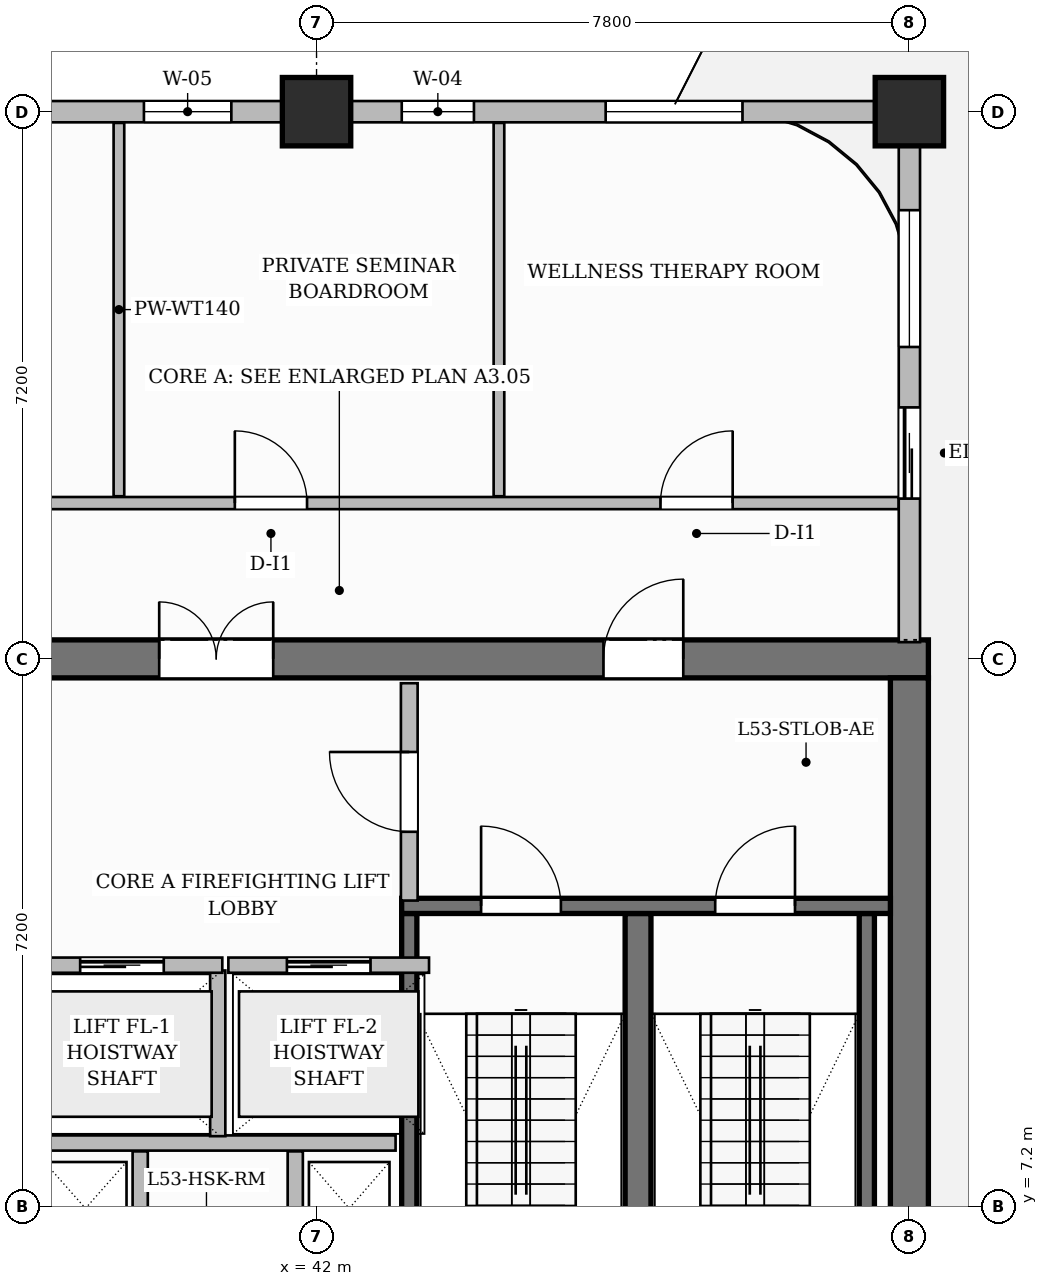
"""IFC4 building model, lengths in metres.
Left out: names, types, materials, properties, quantities, classifications, styles, units other than length and angle.
Written with IfcOpenShell. Run it as: python <this file> out.ifc"""

import sys

from ifc_helpers import new_model, si_unit, direction, frame, frame_2d, origin, origin_2d, place, context, subcontext, project, spatial, rectangle, extrude, source, transform, mapped, element, fill, save


model = new_model("IFC4")
c1 = context("Model", 3, precision=1e-05, world=origin(), true_north=direction((0.0, 1.0)))
c2 = subcontext(c1, "Body", "Model", "MODEL_VIEW")
j1 = project(units=[si_unit("LENGTHUNIT", "METRE"), si_unit("PLANEANGLEUNIT", "RADIAN")], contexts=[c1])
p1 = place(None, origin())
s1 = spatial("IfcSite", under=j1, at=p1, CompositionType="ELEMENT")
p2 = place(p1, origin())
s2 = spatial("IfcBuilding", under=s1, at=p2, CompositionType="ELEMENT")
p3 = place(p2, frame((0.0, 0.0, 213.45)))
s3 = spatial("IfcBuildingStorey", under=s2, at=p3, CompositionType="ELEMENT", Elevation=213.45)
p4 = place(p3, frame((34.55, 14.4, 0.0), z_axis=(0.0, 0.0, 1.0), x_axis=(1.0, 0.0, 0.0)))
e1 = element("IfcWall", 1, at=p4, inside=s3, PredefinedType="SHEAR", context=c2, shape_type="SweptSolid", body=[
    extrude(rectangle(XDim=15.5, YDim=0.5, at=frame_2d((7.75, 0.0))), origin(), (0.0, 0.0, 1.0), 3.85),
])
p5 = place(p4, frame((5.38, 0.0, 0.0)))
e2 = element("IfcOpeningElement", 2, at=p5, cuts=e1, PredefinedType="OPENING", context=c2, shape_type="SweptSolid", body=[
    extrude(rectangle(XDim=1.5, YDim=2.2, at=frame_2d((0.75, 1.1))), frame((0.0, 0.26, 0.0), z_axis=(0.0, -1.0, 0.0), x_axis=(1.0, 0.0, 0.0)), (0.0, 0.0, 1.0), 0.52),
])
p6 = place(p4, frame((1.595, 0.0, 0.0)))
e3 = element("IfcOpeningElement", 3, at=p6, cuts=e1, PredefinedType="OPENING", context=c2, shape_type="SweptSolid", body=[
    extrude(rectangle(XDim=1.05, YDim=2.15, at=frame_2d((0.525, 1.075))), frame((0.0, 0.26, 0.0), z_axis=(0.0, -1.0, 0.0), x_axis=(1.0, 0.0, 0.0)), (0.0, 0.0, 1.0), 0.52),
])
p7 = place(p4, frame((11.225, 0.0, 0.0)))
e4 = element("IfcOpeningElement", 4, at=p7, cuts=e1, PredefinedType="OPENING", context=c2, shape_type="SweptSolid", body=[
    extrude(rectangle(XDim=1.05, YDim=2.15, at=frame_2d((0.525, 1.075))), frame((0.0, 0.26, 0.0), z_axis=(0.0, -1.0, 0.0), x_axis=(1.0, 0.0, 0.0)), (0.0, 0.0, 1.0), 0.52),
])
p8 = place(p3, frame((49.8, 3.85, 0.0), z_axis=(0.0, 0.0, 1.0), x_axis=(0.0, 1.0, 0.0)))
e5 = element("IfcWall", 5, at=p8, inside=s3, PredefinedType="SHEAR", context=c2, shape_type="SweptSolid", body=[
    extrude(rectangle(XDim=10.3, YDim=0.5, at=frame_2d((5.15, 0.0))), origin(), (0.0, 0.0, 1.0), 3.85),
])
m1 = source(origin(), c2, "Body", "SweptSolid", [
    extrude(rectangle(XDim=0.9, YDim=0.9, at=origin_2d()), origin(), (0.0, 0.0, 1.0), 3.85),
])
for number, where, z_axis, x_axis in (
    (6, (42.0, 21.6, 0.0), (0.0, 0.0, 1.0), (1.0, 0.0, 0.0)),
    (7, (49.8, 21.6, 0.0), (0.0, 0.0, 1.0), (1.0, 0.0, 0.0)),
):
    element("IfcColumn", number, at=place(p3, frame(where, z_axis=z_axis, x_axis=x_axis)), inside=s3, PredefinedType="COLUMN", context=c2, shape_type="MappedRepresentation", body=[
        mapped(m1, transform((0.0, 0.0, 0.0), scale=1.0)),
    ])
p9 = place(p3, frame((43.22, 4.1, 0.0), z_axis=(0.0, 0.0, 1.0), x_axis=(0.0, 1.0, 0.0)))
e8 = element("IfcWall", 8, at=p9, inside=s3, PredefinedType="SHEAR", context=c2, shape_type="SweptSolid", body=[
    extrude(rectangle(XDim=6.95, YDim=0.2, at=frame_2d((3.475, 0.0))), origin(), (0.0, 0.0, 1.0), 3.85),
])
p10 = place(p3, frame((46.23, 4.1, 0.0), z_axis=(0.0, 0.0, 1.0), x_axis=(0.0, 1.0, 0.0)))
e9 = element("IfcWall", 9, at=p10, inside=s3, PredefinedType="SHEAR", context=c2, shape_type="SweptSolid", body=[
    extrude(rectangle(XDim=6.95, YDim=0.34, at=frame_2d((3.475, 0.0))), origin(), (0.0, 0.0, 1.0), 3.85),
])
p11 = place(p3, frame((49.24, 4.1, 0.0), z_axis=(0.0, 0.0, 1.0), x_axis=(0.0, 1.0, 0.0)))
e10 = element("IfcWall", 10, at=p11, inside=s3, PredefinedType="SHEAR", context=c2, shape_type="SweptSolid", body=[
    extrude(rectangle(XDim=6.95, YDim=0.2, at=frame_2d((3.475, 0.0))), origin(), (0.0, 0.0, 1.0), 3.85),
])
p12 = place(p3, frame((43.12, 11.15, 0.0), z_axis=(0.0, 0.0, 1.0), x_axis=(1.0, 0.0, 0.0)))
e11 = element("IfcWall", 11, at=p12, inside=s3, PredefinedType="SHEAR", context=c2, shape_type="SweptSolid", body=[
    extrude(rectangle(XDim=6.43, YDim=0.2, at=frame_2d((3.215, 0.0))), origin(), (0.0, 0.0, 1.0), 3.85),
])
p13 = place(p12, frame((1.045, 0.0, 0.0)))
e12 = element("IfcOpeningElement", 12, at=p13, cuts=e11, PredefinedType="OPENING", context=c2, shape_type="SweptSolid", body=[
    extrude(rectangle(XDim=1.05, YDim=2.2, at=frame_2d((0.525, 1.1))), frame((0.0, 0.11, 0.0), z_axis=(0.0, -1.0, 0.0), x_axis=(1.0, 0.0, 0.0)), (0.0, 0.0, 1.0), 0.22),
])
p14 = place(p12, frame((4.125, 0.0, 0.0)))
e13 = element("IfcOpeningElement", 13, at=p14, cuts=e11, PredefinedType="OPENING", context=c2, shape_type="SweptSolid", body=[
    extrude(rectangle(XDim=1.05, YDim=2.2, at=frame_2d((0.525, 1.1))), frame((0.0, 0.11, 0.0), z_axis=(0.0, -1.0, 0.0), x_axis=(1.0, 0.0, 0.0)), (0.0, 0.0, 1.0), 0.22),
])
p15 = place(p3, frame((38.3, 8.03, 0.0), z_axis=(0.0, 0.0, 1.0), x_axis=(1.0, 0.0, 0.0)))
e14 = element("IfcWall", 14, at=p15, inside=s3, PredefinedType="PARTITIONING", context=c2, shape_type="SweptSolid", body=[
    extrude(rectangle(XDim=4.74, YDim=0.2, at=frame_2d((2.37, 0.0))), origin(), (0.0, 0.0, 1.0), 3.6),
])
p16 = place(p3, frame((40.7, 8.12, 0.0), z_axis=(0.0, 0.0, 1.0), x_axis=(0.0, 1.0, 0.0)))
e15 = element("IfcWall", 15, at=p16, inside=s3, PredefinedType="PARTITIONING", context=c2, shape_type="SweptSolid", body=[
    extrude(rectangle(XDim=2.18, YDim=0.2, at=frame_2d((1.09, 0.0))), origin(), (0.0, 0.0, 1.0), 3.6),
])
p17 = place(p3, frame((43.22, 11.22, 0.0), z_axis=(0.0, 0.0, 1.0), x_axis=(0.0, 1.0, 0.0)))
e16 = element("IfcWall", 16, at=p17, inside=s3, PredefinedType="PARTITIONING", context=c2, shape_type="SweptSolid", body=[
    extrude(rectangle(XDim=2.86, YDim=0.22, at=frame_2d((1.43, 0.0))), origin(), (0.0, 0.0, 1.0), 3.6),
])
p18 = place(p17, frame((0.905, 0.0, 0.0)))
e17 = element("IfcOpeningElement", 17, at=p18, cuts=e16, PredefinedType="OPENING", context=c2, shape_type="SweptSolid", body=[
    extrude(rectangle(XDim=1.05, YDim=2.15, at=frame_2d((0.525, 1.075))), frame((0.0, 0.12, 0.0), z_axis=(0.0, -1.0, 0.0), x_axis=(1.0, 0.0, 0.0)), (0.0, 0.0, 1.0), 0.24),
])
for number, where, z_axis, x_axis in (
    (18, (39.68, 6.13, 0.0), (0.0, 0.0, 1.0), (0.0, 1.0, 0.0)),
    (19, (41.72, 6.13, 0.0), (0.0, 0.0, 1.0), (0.0, 1.0, 0.0)),
):
    element("IfcWall", number, at=place(p3, frame(where, z_axis=z_axis, x_axis=x_axis)), inside=s3, PredefinedType="PARTITIONING", context=c2, shape_type="SweptSolid", body=[
        extrude(rectangle(XDim=1.79, YDim=0.2, at=frame_2d((0.895, 0.0))), origin(), (0.0, 0.0, 1.0), 3.6),
    ])
p19 = place(p3, frame((30.29, 16.45, 0.0), z_axis=(0.0, 0.0, 1.0), x_axis=(1.0, 0.0, 0.0)))
e20 = element("IfcWall", 20, at=p19, inside=s3, PredefinedType="PARTITIONING", context=c2, shape_type="SweptSolid", body=[
    extrude(rectangle(XDim=19.37, YDim=0.16, at=frame_2d((9.685, 0.0))), origin(), (0.0, 0.0, 1.0), 3.6),
])
p20 = place(p19, frame((1.135, 0.0, 0.0)))
e21 = element("IfcOpeningElement", 21, at=p20, cuts=e20, PredefinedType="OPENING", context=c2, shape_type="SweptSolid", body=[
    extrude(rectangle(XDim=0.85, YDim=2.1, at=frame_2d((0.425, 1.05))), frame((0.0, 0.09, 0.0), z_axis=(0.0, -1.0, 0.0), x_axis=(1.0, 0.0, 0.0)), (0.0, 0.0, 1.0), 0.18),
])
p21 = place(p19, frame((5.71, 0.0, 0.0)))
e22 = element("IfcOpeningElement", 22, at=p21, cuts=e20, PredefinedType="OPENING", context=c2, shape_type="SweptSolid", body=[
    extrude(rectangle(XDim=0.9, YDim=2.15, at=frame_2d((0.45, 1.075))), frame((0.0, 0.09, 0.0), z_axis=(0.0, -1.0, 0.0), x_axis=(1.0, 0.0, 0.0)), (0.0, 0.0, 1.0), 0.18),
])
p22 = place(p19, frame((10.635, 0.0, 0.0)))
e23 = element("IfcOpeningElement", 23, at=p22, cuts=e20, PredefinedType="OPENING", context=c2, shape_type="SweptSolid", body=[
    extrude(rectangle(XDim=0.95, YDim=2.15, at=frame_2d((0.475, 1.075))), frame((0.0, 0.09, 0.0), z_axis=(0.0, -1.0, 0.0), x_axis=(1.0, 0.0, 0.0)), (0.0, 0.0, 1.0), 0.18),
])
p23 = place(p19, frame((16.235, 0.0, 0.0)))
e24 = element("IfcOpeningElement", 24, at=p23, cuts=e20, PredefinedType="OPENING", context=c2, shape_type="SweptSolid", body=[
    extrude(rectangle(XDim=0.95, YDim=2.15, at=frame_2d((0.475, 1.075))), frame((0.0, 0.09, 0.0), z_axis=(0.0, -1.0, 0.0), x_axis=(1.0, 0.0, 0.0)), (0.0, 0.0, 1.0), 0.18),
])
for number, where, z_axis, x_axis in (
    (25, (39.4, 16.54, 0.0), (0.0, 0.0, 1.0), (0.0, 1.0, 0.0)),
    (26, (44.4, 16.54, 0.0), (0.0, 0.0, 1.0), (0.0, 1.0, 0.0)),
):
    element("IfcWall", number, at=place(p3, frame(where, z_axis=z_axis, x_axis=x_axis)), inside=s3, PredefinedType="PARTITIONING", context=c2, shape_type="SweptSolid", body=[
        extrude(rectangle(XDim=4.912, YDim=0.14, at=frame_2d((2.456, 0.0))), origin(), (0.0, 0.0, 1.0), 3.6),
    ])
p24 = place(p3, frame((38.12, 10.37, 0.0), z_axis=(0.0, 0.0, 1.0), x_axis=(1.0, 0.0, 0.0)))
e27 = element("IfcWall", 27, at=p24, inside=s3, PredefinedType="PARTITIONING", context=c2, shape_type="SweptSolid", body=[
    extrude(rectangle(XDim=2.64, YDim=0.2, at=frame_2d((1.32, 0.0))), origin(), (0.0, 0.0, 1.0), 3.6),
])
p25 = place(p24, frame((0.77, 0.0, 0.0)))
e28 = element("IfcOpeningElement", 28, at=p25, cuts=e27, PredefinedType="OPENING", context=c2, shape_type="SweptSolid", body=[
    extrude(rectangle(XDim=1.1, YDim=2.2, at=frame_2d((0.55, 1.1))), frame((0.0, 0.11, 0.0), z_axis=(0.0, -1.0, 0.0), x_axis=(1.0, 0.0, 0.0)), (0.0, 0.0, 1.0), 0.22),
])
p26 = place(p3, frame((40.84, 10.37, 0.0), z_axis=(0.0, 0.0, 1.0), x_axis=(1.0, 0.0, 0.0)))
e29 = element("IfcWall", 29, at=p26, inside=s3, PredefinedType="PARTITIONING", context=c2, shape_type="SweptSolid", body=[
    extrude(rectangle(XDim=2.64, YDim=0.2, at=frame_2d((1.32, 0.0))), origin(), (0.0, 0.0, 1.0), 3.6),
])
p27 = place(p26, frame((0.77, 0.0, 0.0)))
e30 = element("IfcOpeningElement", 30, at=p27, cuts=e29, PredefinedType="OPENING", context=c2, shape_type="SweptSolid", body=[
    extrude(rectangle(XDim=1.1, YDim=2.2, at=frame_2d((0.55, 1.1))), frame((0.0, 0.11, 0.0), z_axis=(0.0, -1.0, 0.0), x_axis=(1.0, 0.0, 0.0)), (0.0, 0.0, 1.0), 0.22),
])
p28 = place(p3, frame((49.8, 14.62, 0.0), z_axis=(0.0, 0.0, 1.0), x_axis=(0.0, 1.0, 0.0)))
e31 = element("IfcWall", 31, at=p28, inside=s3, PredefinedType="SOLIDWALL", context=c2, shape_type="SweptSolid", body=[
    extrude(rectangle(XDim=6.93, YDim=0.28, at=frame_2d((3.465, 0.0))), origin(), (0.0, 0.0, 1.0), 3.135),
])
p29 = place(p28, frame((1.889, 0.0, 0.0)))
e32 = element("IfcOpeningElement", 32, at=p29, cuts=e31, PredefinedType="OPENING", context=c2, shape_type="SweptSolid", body=[
    extrude(rectangle(XDim=1.2, YDim=2.2, at=frame_2d((0.6, 1.1))), frame((0.0, 0.15, 0.0), z_axis=(0.0, -1.0, 0.0), x_axis=(1.0, 0.0, 0.0)), (0.0, 0.0, 1.0), 0.3),
])
p30 = place(p28, frame((3.884, 0.0, 0.8)))
e33 = element("IfcOpeningElement", 33, at=p30, cuts=e31, PredefinedType="OPENING", context=c2, shape_type="SweptSolid", body=[
    extrude(rectangle(XDim=1.8, YDim=1.85, at=frame_2d((0.9, 0.925))), frame((0.0, 0.15, 0.0), z_axis=(0.0, -1.0, 0.0), x_axis=(1.0, 0.0, 0.0)), (0.0, 0.0, 1.0), 0.3),
])
p31 = place(p3, frame((14.4, 21.6, 0.0), z_axis=(0.0, 0.0, 1.0), x_axis=(1.0, 0.0, 0.0)))
e34 = element("IfcWall", 34, at=p31, inside=s3, PredefinedType="SOLIDWALL", context=c2, shape_type="SweptSolid", body=[
    extrude(rectangle(XDim=35.4, YDim=0.28, at=frame_2d((17.7, 0.0))), origin(), (0.0, 0.0, 1.0), 3.135),
])
p32 = place(p31, frame((1.196, 0.0, 0.8)))
e35 = element("IfcOpeningElement", 35, at=p32, cuts=e34, PredefinedType="OPENING", context=c2, shape_type="SweptSolid", body=[
    extrude(rectangle(XDim=1.15, YDim=1.8, at=frame_2d((0.575, 0.9))), frame((0.0, 0.15, 0.0), z_axis=(0.0, -1.0, 0.0), x_axis=(1.0, 0.0, 0.0)), (0.0, 0.0, 1.0), 0.3),
])
p33 = place(p31, frame((3.679, 0.0, 0.8)))
e36 = element("IfcOpeningElement", 36, at=p33, cuts=e34, PredefinedType="OPENING", context=c2, shape_type="SweptSolid", body=[
    extrude(rectangle(XDim=1.8, YDim=1.85, at=frame_2d((0.9, 0.925))), frame((0.0, 0.15, 0.0), z_axis=(0.0, -1.0, 0.0), x_axis=(1.0, 0.0, 0.0)), (0.0, 0.0, 1.0), 0.3),
])
p34 = place(p31, frame((8.181, 0.0, 0.8)))
e37 = element("IfcOpeningElement", 37, at=p34, cuts=e34, PredefinedType="OPENING", context=c2, shape_type="SweptSolid", body=[
    extrude(rectangle(XDim=0.95, YDim=1.75, at=frame_2d((0.475, 0.875))), frame((0.0, 0.15, 0.0), z_axis=(0.0, -1.0, 0.0), x_axis=(1.0, 0.0, 0.0)), (0.0, 0.0, 1.0), 0.3),
])
p35 = place(p31, frame((10.564, 0.0, 0.8)))
e38 = element("IfcOpeningElement", 38, at=p35, cuts=e34, PredefinedType="OPENING", context=c2, shape_type="SweptSolid", body=[
    extrude(rectangle(XDim=1.8, YDim=1.85, at=frame_2d((0.9, 0.925))), frame((0.0, 0.15, 0.0), z_axis=(0.0, -1.0, 0.0), x_axis=(1.0, 0.0, 0.0)), (0.0, 0.0, 1.0), 0.3),
])
p36 = place(p31, frame((16.551, 0.0, 0.8)))
e39 = element("IfcOpeningElement", 39, at=p36, cuts=e34, PredefinedType="OPENING", context=c2, shape_type="SweptSolid", body=[
    extrude(rectangle(XDim=1.8, YDim=1.85, at=frame_2d((0.9, 0.925))), frame((0.0, 0.15, 0.0), z_axis=(0.0, -1.0, 0.0), x_axis=(1.0, 0.0, 0.0)), (0.0, 0.0, 1.0), 0.3),
])
p37 = place(p31, frame((22.196, 0.0, 0.8)))
e40 = element("IfcOpeningElement", 40, at=p37, cuts=e34, PredefinedType="OPENING", context=c2, shape_type="SweptSolid", body=[
    extrude(rectangle(XDim=1.8, YDim=1.85, at=frame_2d((0.9, 0.925))), frame((0.0, 0.15, 0.0), z_axis=(0.0, -1.0, 0.0), x_axis=(1.0, 0.0, 0.0)), (0.0, 0.0, 1.0), 0.3),
])
p38 = place(p31, frame((25.329, 0.0, 0.8)))
e41 = element("IfcOpeningElement", 41, at=p38, cuts=e34, PredefinedType="OPENING", context=c2, shape_type="SweptSolid", body=[
    extrude(rectangle(XDim=1.15, YDim=1.8, at=frame_2d((0.575, 0.9))), frame((0.0, 0.15, 0.0), z_axis=(0.0, -1.0, 0.0), x_axis=(1.0, 0.0, 0.0)), (0.0, 0.0, 1.0), 0.3),
])
p39 = place(p31, frame((28.721, 0.0, 0.8)))
e42 = element("IfcOpeningElement", 42, at=p39, cuts=e34, PredefinedType="OPENING", context=c2, shape_type="SweptSolid", body=[
    extrude(rectangle(XDim=0.95, YDim=1.75, at=frame_2d((0.475, 0.875))), frame((0.0, 0.15, 0.0), z_axis=(0.0, -1.0, 0.0), x_axis=(1.0, 0.0, 0.0)), (0.0, 0.0, 1.0), 0.3),
])
p40 = place(p31, frame((31.404, 0.0, 0.8)))
e43 = element("IfcOpeningElement", 43, at=p40, cuts=e34, PredefinedType="OPENING", context=c2, shape_type="SweptSolid", body=[
    extrude(rectangle(XDim=1.8, YDim=1.85, at=frame_2d((0.9, 0.925))), frame((0.0, 0.15, 0.0), z_axis=(0.0, -1.0, 0.0), x_axis=(1.0, 0.0, 0.0)), (0.0, 0.0, 1.0), 0.3),
])
m2 = source(origin(), c2, "Body", "SweptSolid", [
    extrude(rectangle(XDim=1.05, YDim=2.2, at=frame_2d((0.525, 1.1))), frame((0.0, 0.025, 0.0), z_axis=(0.0, -1.0, 0.0), x_axis=(1.0, 0.0, 0.0)), (0.0, 0.0, 1.0), 0.05),
])
p41 = place(p13, origin())
e44 = element("IfcDoor", 44, at=p41, inside=s3, OperationType="SINGLE_SWING_LEFT", PredefinedType="DOOR", context=c2, shape_type="MappedRepresentation", body=[
    mapped(m2, transform((0.0, 0.0, 0.0), scale=1.0)),
])
fill(e12, e44)
p42 = place(p14, origin())
e45 = element("IfcDoor", 45, at=p42, inside=s3, OperationType="SINGLE_SWING_RIGHT", PredefinedType="DOOR", context=c2, shape_type="MappedRepresentation", body=[
    mapped(m2, transform((0.0, 0.0, 0.0), scale=1.0)),
])
fill(e13, e45)
m3 = source(origin(), c2, "Body", "SweptSolid", [
    extrude(rectangle(XDim=1.05, YDim=2.15, at=frame_2d((0.525, 1.075))), frame((0.0, 0.025, 0.0), z_axis=(0.0, -1.0, 0.0), x_axis=(1.0, 0.0, 0.0)), (0.0, 0.0, 1.0), 0.05),
])
p43 = place(p18, origin())
e46 = element("IfcDoor", 46, at=p43, inside=s3, OperationType="SINGLE_SWING_RIGHT", PredefinedType="DOOR", context=c2, shape_type="MappedRepresentation", body=[
    mapped(m3, transform((0.0, 0.0, 0.0), scale=1.0)),
])
fill(e17, e46)
m4 = source(origin(), c2, "Body", "SweptSolid", [
    extrude(rectangle(XDim=1.5, YDim=2.2, at=frame_2d((0.75, 1.1))), frame((0.0, 0.025, 0.0), z_axis=(0.0, -1.0, 0.0), x_axis=(1.0, 0.0, 0.0)), (0.0, 0.0, 1.0), 0.05),
])
p44 = place(p5, origin())
e47 = element("IfcDoor", 47, at=p44, inside=s3, OperationType="DOUBLE_DOOR_SINGLE_SWING", PredefinedType="DOOR", context=c2, shape_type="MappedRepresentation", body=[
    mapped(m4, transform((0.0, 0.0, 0.0), scale=1.0)),
])
fill(e2, e47)
p45 = place(p7, origin())
e48 = element("IfcDoor", 48, at=p45, inside=s3, OperationType="SINGLE_SWING_RIGHT", PredefinedType="DOOR", context=c2, shape_type="MappedRepresentation", body=[
    mapped(m3, transform((0.0, 0.0, 0.0), scale=1.0)),
])
fill(e4, e48)
m5 = source(origin(), c2, "Body", "SweptSolid", [
    extrude(rectangle(XDim=0.95, YDim=2.15, at=frame_2d((0.475, 1.075))), frame((0.0, 0.025, 0.0), z_axis=(0.0, -1.0, 0.0), x_axis=(1.0, 0.0, 0.0)), (0.0, 0.0, 1.0), 0.05),
])
p46 = place(p22, origin())
e49 = element("IfcDoor", 49, at=p46, inside=s3, OperationType="SINGLE_SWING_LEFT", PredefinedType="DOOR", context=c2, shape_type="MappedRepresentation", body=[
    mapped(m5, transform((0.0, 0.0, 0.0), scale=1.0)),
])
fill(e23, e49)
p47 = place(p23, origin())
e50 = element("IfcDoor", 50, at=p47, inside=s3, OperationType="SINGLE_SWING_RIGHT", PredefinedType="DOOR", context=c2, shape_type="MappedRepresentation", body=[
    mapped(m5, transform((0.0, 0.0, 0.0), scale=1.0)),
])
fill(e24, e50)
m6 = source(origin(), c2, "Body", "SweptSolid", [
    extrude(rectangle(XDim=1.1, YDim=2.2, at=frame_2d((0.55, 1.1))), frame((0.0, 0.025, 0.0), z_axis=(0.0, -1.0, 0.0), x_axis=(1.0, 0.0, 0.0)), (0.0, 0.0, 1.0), 0.05),
])
p48 = place(p25, origin())
e51 = element("IfcDoor", 51, at=p48, inside=s3, OperationType="SLIDING_TO_LEFT", PredefinedType="DOOR", context=c2, shape_type="MappedRepresentation", body=[
    mapped(m6, transform((0.0, 0.0, 0.0), scale=1.0)),
])
fill(e28, e51)
p49 = place(p27, origin())
e52 = element("IfcDoor", 52, at=p49, inside=s3, OperationType="SLIDING_TO_LEFT", PredefinedType="DOOR", context=c2, shape_type="MappedRepresentation", body=[
    mapped(m6, transform((0.0, 0.0, 0.0), scale=1.0)),
])
fill(e30, e52)
m7 = source(origin(), c2, "Body", "SweptSolid", [
    extrude(rectangle(XDim=1.2, YDim=2.2, at=frame_2d((0.6, 1.1))), frame((0.0, 0.025, 0.0), z_axis=(0.0, -1.0, 0.0), x_axis=(1.0, 0.0, 0.0)), (0.0, 0.0, 1.0), 0.05),
])
p50 = place(p29, origin())
e53 = element("IfcDoor", 53, at=p50, inside=s3, OperationType="SLIDING_TO_LEFT", PredefinedType="DOOR", context=c2, shape_type="MappedRepresentation", body=[
    mapped(m7, transform((0.0, 0.0, 0.0), scale=1.0)),
])
fill(e32, e53)
m8 = source(origin(), c2, "Body", "SweptSolid", [
    extrude(rectangle(XDim=1.8, YDim=1.85, at=frame_2d((0.9, 0.925))), frame((0.0, 0.03, 0.0), z_axis=(0.0, -1.0, 0.0), x_axis=(1.0, 0.0, 0.0)), (0.0, 0.0, 1.0), 0.06),
])
p51 = place(p30, origin())
e54 = element("IfcWindow", 54, at=p51, inside=s3, PartitioningType="DOUBLE_PANEL_VERTICAL", PredefinedType="WINDOW", context=c2, shape_type="MappedRepresentation", body=[
    mapped(m8, transform((0.0, 0.0, 0.0), scale=1.0)),
])
fill(e33, e54)
m9 = source(origin(), c2, "Body", "SweptSolid", [
    extrude(rectangle(XDim=1.15, YDim=1.8, at=frame_2d((0.575, 0.9))), frame((0.0, 0.03, 0.0), z_axis=(0.0, -1.0, 0.0), x_axis=(1.0, 0.0, 0.0)), (0.0, 0.0, 1.0), 0.06),
])
p52 = place(p38, origin())
e55 = element("IfcWindow", 55, at=p52, inside=s3, PartitioningType="SINGLE_PANEL", PredefinedType="WINDOW", context=c2, shape_type="MappedRepresentation", body=[
    mapped(m9, transform((0.0, 0.0, 0.0), scale=1.0)),
])
fill(e41, e55)
m10 = source(origin(), c2, "Body", "SweptSolid", [
    extrude(rectangle(XDim=0.95, YDim=1.75, at=frame_2d((0.475, 0.875))), frame((0.0, 0.03, 0.0), z_axis=(0.0, -1.0, 0.0), x_axis=(1.0, 0.0, 0.0)), (0.0, 0.0, 1.0), 0.06),
])
p53 = place(p39, origin())
e56 = element("IfcWindow", 56, at=p53, inside=s3, PartitioningType="SINGLE_PANEL", PredefinedType="WINDOW", context=c2, shape_type="MappedRepresentation", body=[
    mapped(m10, transform((0.0, 0.0, 0.0), scale=1.0)),
])
fill(e42, e56)
p54 = place(p40, origin())
e57 = element("IfcWindow", 57, at=p54, inside=s3, PartitioningType="DOUBLE_PANEL_VERTICAL", PredefinedType="WINDOW", context=c2, shape_type="MappedRepresentation", body=[
    mapped(m8, transform((0.0, 0.0, 0.0), scale=1.0)),
])
fill(e43, e57)
save(model, sys.argv[1])
